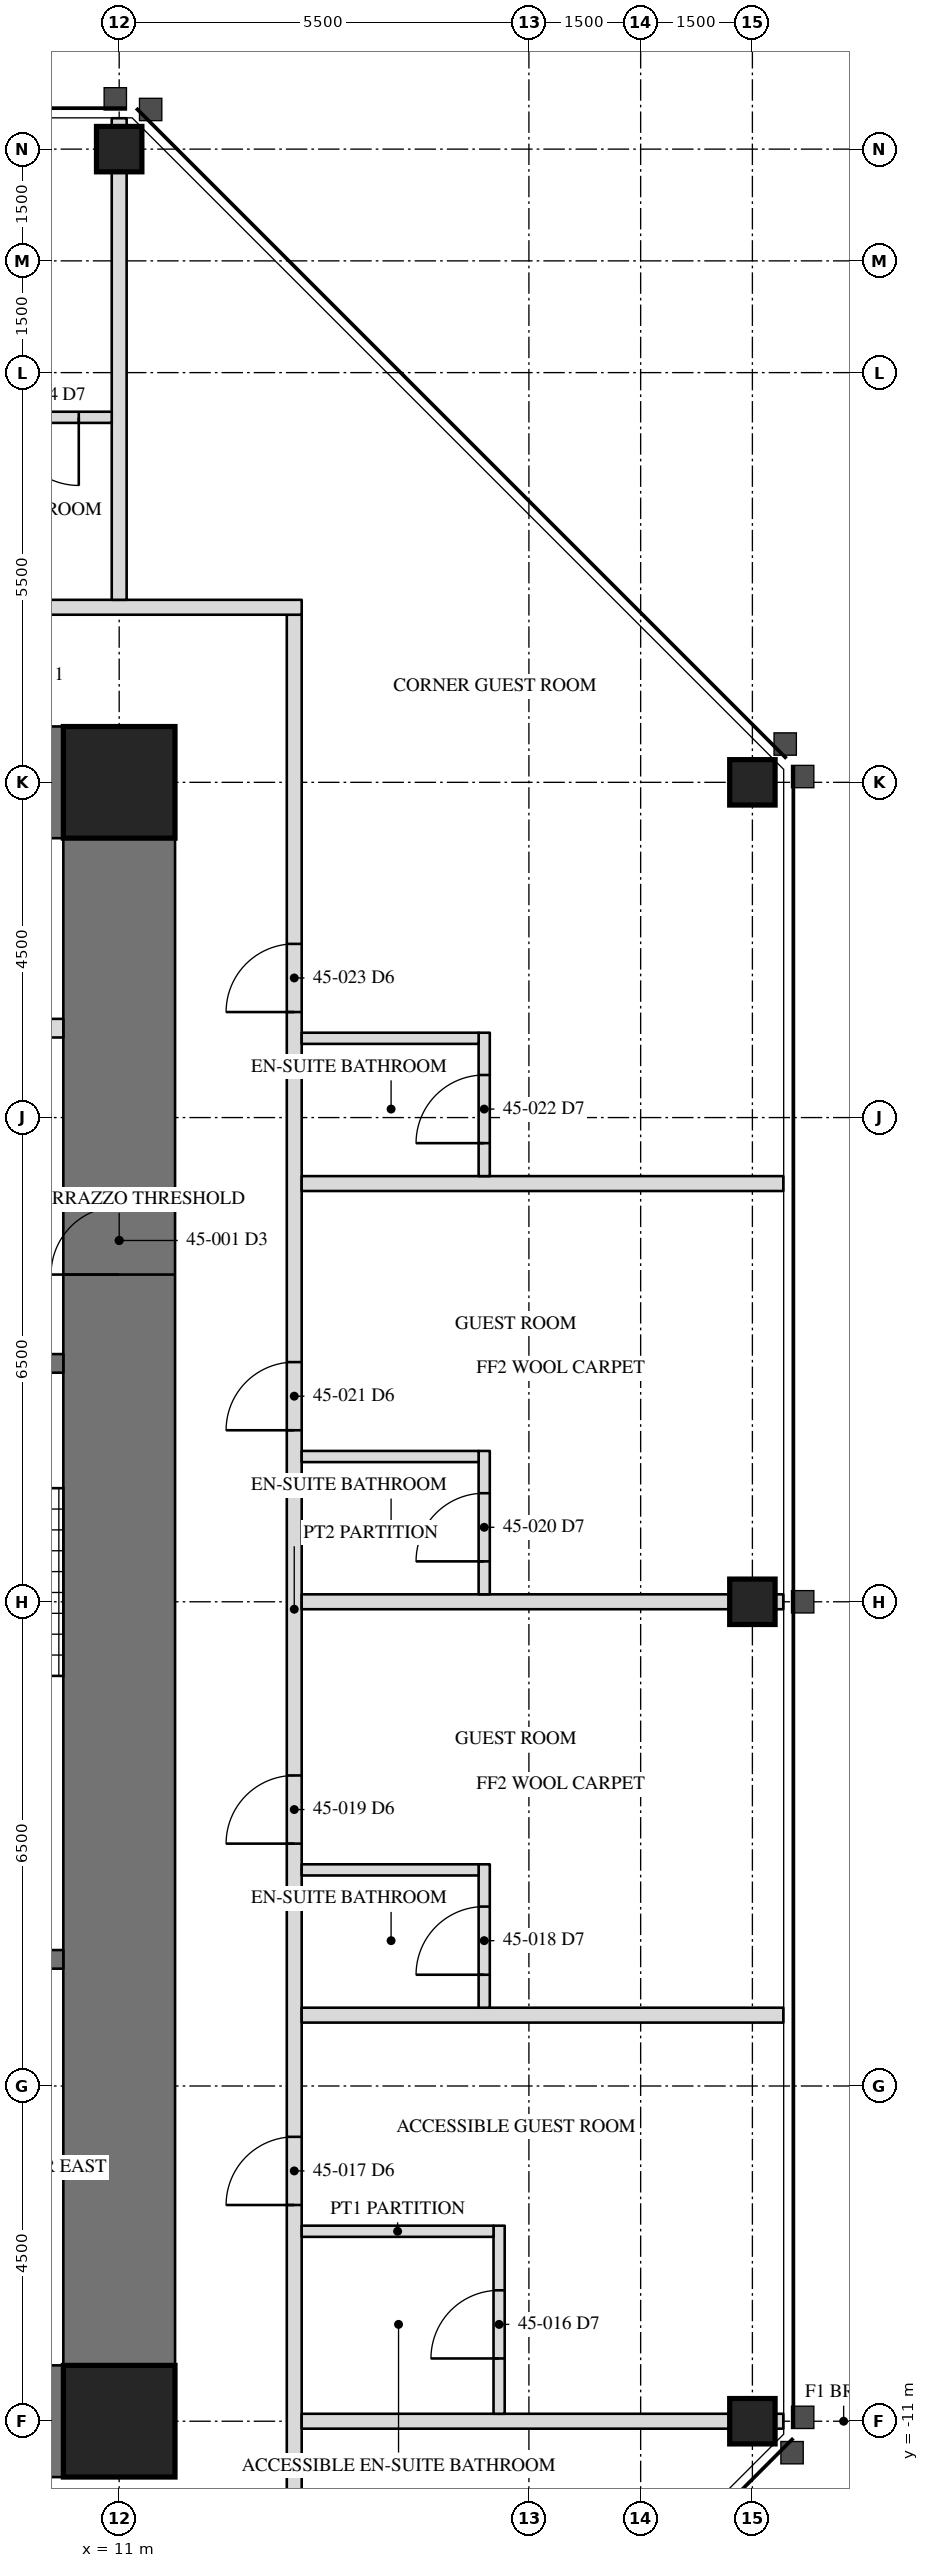
"""IFC4 building model, lengths in metres.
Left out: names, types, materials, properties, quantities, classifications, styles, units other than length and angle.
Written with IfcOpenShell. Run it as: python <this file> out.ifc"""

import sys

from ifc_helpers import new_model, si_unit, direction, frame, frame_2d, origin, origin_2d, place, context, subcontext, project, spatial, rectangle, hollow_rectangle, extrude, element, fill, save


model = new_model("IFC4")
c1 = context("Model", 3, precision=1e-05, world=origin(), true_north=direction((0.0, 1.0)))
c2 = subcontext(c1, "Body", "Model", "MODEL_VIEW")
j1 = project(units=[si_unit("LENGTHUNIT", "METRE"), si_unit("PLANEANGLEUNIT", "RADIAN")], contexts=[c1])
p1 = place(None, origin())
s1 = spatial("IfcSite", under=j1, at=p1, CompositionType="ELEMENT")
p2 = place(p1, origin())
s2 = spatial("IfcBuilding", under=s1, at=p2, CompositionType="ELEMENT")
p3 = place(p2, frame((0.0, 0.0, 194.2)))
s3 = spatial("IfcBuildingStorey", under=s2, at=p3, CompositionType="ELEMENT", Elevation=194.2)
for number, where, z_axis, x_axis in (
    (1, (19.5, -11.0, 0.0), (0.0, 0.0, 1.0), (0.0, 1.0, 0.0)),
    (2, (19.5, 0.0, 0.0), (0.0, 0.0, 1.0), (0.0, 1.0, 0.0)),
    (3, (19.5, 11.0, 0.0), (0.0, 0.0, 1.0), (0.0, 1.0, 0.0)),
    (4, (11.0, 19.5, 0.0), (0.0, 0.0, 1.0), (1.0, 0.0, 0.0)),
):
    element("IfcColumn", number, at=place(p3, frame(where, z_axis=z_axis, x_axis=x_axis)), inside=s3, PredefinedType="COLUMN", context=c2, shape_type="SweptSolid", body=[
        extrude(hollow_rectangle(XDim=0.61, YDim=0.61, WallThickness=0.076, at=origin_2d()), origin(), (0.0, 0.0, 1.0), 3.5),
    ])
p4 = place(p3, frame((11.0, -11.0, 0.0), z_axis=(0.0, 0.0, 1.0), x_axis=(0.0, 1.0, 0.0)))
e5 = element("IfcWall", 5, at=p4, inside=s3, PredefinedType="SHEAR", context=c2, shape_type="SweptSolid", body=[
    extrude(rectangle(XDim=22.0, YDim=1.5, at=frame_2d((11.0, 0.0))), origin(), (0.0, 0.0, 1.0), 3.5),
])
p5 = place(p4, frame((15.393, 0.0, 0.0)))
e6 = element("IfcOpeningElement", 6, at=p5, cuts=e5, PredefinedType="OPENING", context=c2, shape_type="SweptSolid", body=[
    extrude(rectangle(XDim=0.915, YDim=2.134, at=frame_2d((0.458, 1.067))), frame((0.0, 0.76, 0.0), z_axis=(0.0, -1.0, 0.0), x_axis=(1.0, 0.0, 0.0)), (0.0, 0.0, 1.0), 1.52),
])
for number, where, z_axis, x_axis in (
    (7, (11.0, 11.0, 0.0), (0.0, 0.0, 1.0), (-1.0, 0.0, 0.0)),
    (8, (6.5, -11.0, 0.0), (0.0, 0.0, 1.0), (1.0, 0.0, 0.0)),
):
    element("IfcWall", number, at=place(p3, frame(where, z_axis=z_axis, x_axis=x_axis)), inside=s3, PredefinedType="SHEAR", context=c2, shape_type="SweptSolid", body=[
        extrude(rectangle(XDim=4.5, YDim=1.5, at=frame_2d((2.25, 0.0))), origin(), (0.0, 0.0, 1.0), 3.5),
    ])
for number, where, z_axis, x_axis in (
    (9, (11.0, 11.0, 0.0), (0.0, 0.0, 1.0), (1.0, 0.0, 0.0)),
    (10, (11.0, -11.0, 0.0), (0.0, 0.0, 1.0), (1.0, 0.0, 0.0)),
):
    element("IfcColumn", number, at=place(p3, frame(where, z_axis=z_axis, x_axis=x_axis)), inside=s3, PredefinedType="COLUMN", context=c2, shape_type="SweptSolid", body=[
        extrude(hollow_rectangle(XDim=1.499, YDim=1.499, WallThickness=0.102, at=origin_2d()), origin(), (0.0, 0.0, 1.0), 3.5),
    ])
p6 = place(p3, frame((6.95, -4.8, 0.0), z_axis=(0.0, 0.0, 1.0), x_axis=(1.0, 0.0, 0.0)))
e11 = element("IfcWall", 11, at=p6, inside=s3, PredefinedType="SOLIDWALL", context=c2, shape_type="SweptSolid", body=[
    extrude(rectangle(XDim=3.3, YDim=0.25, at=frame_2d((1.65, 0.0))), origin(), (0.0, 0.0, 1.0), 3.31),
])
p7 = place(p3, frame((6.95, 3.2, 0.0), z_axis=(0.0, 0.0, 1.0), x_axis=(1.0, 0.0, 0.0)))
e12 = element("IfcWall", 12, at=p7, inside=s3, PredefinedType="SOLIDWALL", context=c2, shape_type="SweptSolid", body=[
    extrude(rectangle(XDim=3.3, YDim=0.25, at=frame_2d((1.65, 0.0))), origin(), (0.0, 0.0, 1.0), 3.31),
])
p8 = place(p7, frame((1.116, 0.0, 0.0)))
e13 = element("IfcOpeningElement", 13, at=p8, cuts=e12, PredefinedType="OPENING", context=c2, shape_type="SweptSolid", body=[
    extrude(rectangle(XDim=1.067, YDim=2.134, at=frame_2d((0.533, 1.067))), frame((0.0, 0.135, 0.0), z_axis=(0.0, -1.0, 0.0), x_axis=(1.0, 0.0, 0.0)), (0.0, 0.0, 1.0), 0.27),
])
p9 = place(p3, frame((6.95, 7.7, 0.0), z_axis=(0.0, 0.0, 1.0), x_axis=(1.0, 0.0, 0.0)))
e14 = element("IfcWall", 14, at=p9, inside=s3, PredefinedType="PARTITIONING", context=c2, shape_type="SweptSolid", body=[
    extrude(rectangle(XDim=3.3, YDim=0.25, at=frame_2d((1.65, 0.0))), origin(), (0.0, 0.0, 1.0), 3.31),
])
p10 = place(p9, frame((0.45, 0.0, 0.0)))
e15 = element("IfcOpeningElement", 15, at=p10, cuts=e14, PredefinedType="OPENING", context=c2, shape_type="SweptSolid", body=[
    extrude(rectangle(XDim=1.219, YDim=2.134, at=frame_2d((0.609, 1.067))), frame((0.0, 0.135, 0.0), z_axis=(0.0, -1.0, 0.0), x_axis=(1.0, 0.0, 0.0)), (0.0, 0.0, 1.0), 0.27),
])
p11 = place(p3, frame((13.35, -13.45, 0.0), z_axis=(0.0, 0.0, 1.0), x_axis=(0.0, 1.0, 0.0)))
e16 = element("IfcWall", 16, at=p11, inside=s3, PredefinedType="PARTITIONING", context=c2, shape_type="SweptSolid", body=[
    extrude(rectangle(XDim=26.7, YDim=0.2, at=frame_2d((13.35, 0.0))), origin(), (0.0, 0.0, 1.0), 3.31),
])
p12 = place(p11, frame((5.353, 0.0, 0.0)))
e17 = element("IfcOpeningElement", 17, at=p12, cuts=e16, PredefinedType="OPENING", context=c2, shape_type="SweptSolid", body=[
    extrude(rectangle(XDim=0.915, YDim=2.134, at=frame_2d((0.458, 1.067))), frame((0.0, 0.11, 0.0), z_axis=(0.0, -1.0, 0.0), x_axis=(1.0, 0.0, 0.0)), (0.0, 0.0, 1.0), 0.22),
])
p13 = place(p11, frame((10.204, 0.0, 0.0)))
e18 = element("IfcOpeningElement", 18, at=p13, cuts=e16, PredefinedType="OPENING", context=c2, shape_type="SweptSolid", body=[
    extrude(rectangle(XDim=0.915, YDim=2.134, at=frame_2d((0.458, 1.067))), frame((0.0, 0.11, 0.0), z_axis=(0.0, -1.0, 0.0), x_axis=(1.0, 0.0, 0.0)), (0.0, 0.0, 1.0), 0.22),
])
p14 = place(p11, frame((15.752, 0.0, 0.0)))
e19 = element("IfcOpeningElement", 19, at=p14, cuts=e16, PredefinedType="OPENING", context=c2, shape_type="SweptSolid", body=[
    extrude(rectangle(XDim=0.915, YDim=2.134, at=frame_2d((0.458, 1.067))), frame((0.0, 0.11, 0.0), z_axis=(0.0, -1.0, 0.0), x_axis=(1.0, 0.0, 0.0)), (0.0, 0.0, 1.0), 0.22),
])
p15 = place(p11, frame((21.366, 0.0, 0.0)))
e20 = element("IfcOpeningElement", 20, at=p15, cuts=e16, PredefinedType="OPENING", context=c2, shape_type="SweptSolid", body=[
    extrude(rectangle(XDim=0.915, YDim=2.134, at=frame_2d((0.458, 1.067))), frame((0.0, 0.11, 0.0), z_axis=(0.0, -1.0, 0.0), x_axis=(1.0, 0.0, 0.0)), (0.0, 0.0, 1.0), 0.22),
])
p16 = place(p3, frame((13.45, 13.35, 0.0), z_axis=(0.0, 0.0, 1.0), x_axis=(-1.0, 0.0, 0.0)))
e21 = element("IfcWall", 21, at=p16, inside=s3, PredefinedType="PARTITIONING", context=c2, shape_type="SweptSolid", body=[
    extrude(rectangle(XDim=26.7, YDim=0.2, at=frame_2d((13.35, 0.0))), origin(), (0.0, 0.0, 1.0), 3.31),
])
p17 = place(p16, frame((4.752, 0.0, 0.0)))
e22 = element("IfcOpeningElement", 22, at=p17, cuts=e21, PredefinedType="OPENING", context=c2, shape_type="SweptSolid", body=[
    extrude(rectangle(XDim=0.915, YDim=2.134, at=frame_2d((0.458, 1.067))), frame((0.0, 0.11, 0.0), z_axis=(0.0, -1.0, 0.0), x_axis=(1.0, 0.0, 0.0)), (0.0, 0.0, 1.0), 0.22),
])
p18 = place(p16, frame((10.204, 0.0, 0.0)))
e23 = element("IfcOpeningElement", 23, at=p18, cuts=e21, PredefinedType="OPENING", context=c2, shape_type="SweptSolid", body=[
    extrude(rectangle(XDim=0.915, YDim=2.134, at=frame_2d((0.458, 1.067))), frame((0.0, 0.11, 0.0), z_axis=(0.0, -1.0, 0.0), x_axis=(1.0, 0.0, 0.0)), (0.0, 0.0, 1.0), 0.22),
])
p19 = place(p16, frame((15.752, 0.0, 0.0)))
e24 = element("IfcOpeningElement", 24, at=p19, cuts=e21, PredefinedType="OPENING", context=c2, shape_type="SweptSolid", body=[
    extrude(rectangle(XDim=0.915, YDim=2.134, at=frame_2d((0.458, 1.067))), frame((0.0, 0.11, 0.0), z_axis=(0.0, -1.0, 0.0), x_axis=(1.0, 0.0, 0.0)), (0.0, 0.0, 1.0), 0.22),
])
p20 = place(p16, frame((21.366, 0.0, 0.0)))
e25 = element("IfcOpeningElement", 25, at=p20, cuts=e21, PredefinedType="OPENING", context=c2, shape_type="SweptSolid", body=[
    extrude(rectangle(XDim=0.915, YDim=2.134, at=frame_2d((0.458, 1.067))), frame((0.0, 0.11, 0.0), z_axis=(0.0, -1.0, 0.0), x_axis=(1.0, 0.0, 0.0)), (0.0, 0.0, 1.0), 0.22),
])
p21 = place(p3, frame((13.45, -11.0, 0.0), z_axis=(0.0, 0.0, 1.0), x_axis=(1.0, 0.0, 0.0)))
e26 = element("IfcWall", 26, at=p21, inside=s3, PredefinedType="PARTITIONING", context=c2, shape_type="SweptSolid", body=[
    extrude(rectangle(XDim=6.465, YDim=0.2, at=frame_2d((3.232, 0.0))), origin(), (0.0, 0.0, 1.0), 2.802),
])
p22 = place(p3, frame((13.45, -5.549, 0.0), z_axis=(0.0, 0.0, 1.0), x_axis=(1.0, 0.0, 0.0)))
e27 = element("IfcWall", 27, at=p22, inside=s3, PredefinedType="PARTITIONING", context=c2, shape_type="SweptSolid", body=[
    extrude(rectangle(XDim=6.465, YDim=0.2, at=frame_2d((3.232, 0.0))), origin(), (0.0, 0.0, 1.0), 3.31),
])
p23 = place(p3, frame((13.45, 0.0, 0.0), z_axis=(0.0, 0.0, 1.0), x_axis=(1.0, 0.0, 0.0)))
e28 = element("IfcWall", 28, at=p23, inside=s3, PredefinedType="PARTITIONING", context=c2, shape_type="SweptSolid", body=[
    extrude(rectangle(XDim=6.465, YDim=0.2, at=frame_2d((3.232, 0.0))), origin(), (0.0, 0.0, 1.0), 2.802),
])
p24 = place(p3, frame((13.45, 5.614, 0.0), z_axis=(0.0, 0.0, 1.0), x_axis=(1.0, 0.0, 0.0)))
e29 = element("IfcWall", 29, at=p24, inside=s3, PredefinedType="PARTITIONING", context=c2, shape_type="SweptSolid", body=[
    extrude(rectangle(XDim=6.465, YDim=0.2, at=frame_2d((3.232, 0.0))), origin(), (0.0, 0.0, 1.0), 3.31),
])
p25 = place(p3, frame((16.1, -10.9, 0.0), z_axis=(0.0, 0.0, 1.0), x_axis=(0.0, 1.0, 0.0)))
e30 = element("IfcWall", 30, at=p25, inside=s3, PredefinedType="PARTITIONING", context=c2, shape_type="SweptSolid", body=[
    extrude(rectangle(XDim=2.525, YDim=0.15, at=frame_2d((1.262, 0.0))), origin(), (0.0, 0.0, 1.0), 3.31),
])
p26 = place(p25, frame((0.742, 0.0, 0.0)))
e31 = element("IfcOpeningElement", 31, at=p26, cuts=e30, PredefinedType="OPENING", context=c2, shape_type="SweptSolid", body=[
    extrude(rectangle(XDim=0.915, YDim=2.032, at=frame_2d((0.458, 1.016))), frame((0.0, 0.085, 0.0), z_axis=(0.0, -1.0, 0.0), x_axis=(1.0, 0.0, 0.0)), (0.0, 0.0, 1.0), 0.17),
])
p27 = place(p3, frame((13.45, -8.45, 0.0), z_axis=(0.0, 0.0, 1.0), x_axis=(1.0, 0.0, 0.0)))
e32 = element("IfcWall", 32, at=p27, inside=s3, PredefinedType="PARTITIONING", context=c2, shape_type="SweptSolid", body=[
    extrude(rectangle(XDim=2.575, YDim=0.15, at=frame_2d((1.288, 0.0))), origin(), (0.0, 0.0, 1.0), 3.31),
])
p28 = place(p3, frame((15.9, -5.449, 0.0), z_axis=(0.0, 0.0, 1.0), x_axis=(0.0, 1.0, 0.0)))
e33 = element("IfcWall", 33, at=p28, inside=s3, PredefinedType="PARTITIONING", context=c2, shape_type="SweptSolid", body=[
    extrude(rectangle(XDim=1.925, YDim=0.15, at=frame_2d((0.962, 0.0))), origin(), (0.0, 0.0, 1.0), 3.31),
])
p29 = place(p28, frame((0.442, 0.0, 0.0)))
e34 = element("IfcOpeningElement", 34, at=p29, cuts=e33, PredefinedType="OPENING", context=c2, shape_type="SweptSolid", body=[
    extrude(rectangle(XDim=0.915, YDim=2.032, at=frame_2d((0.458, 1.016))), frame((0.0, 0.085, 0.0), z_axis=(0.0, -1.0, 0.0), x_axis=(1.0, 0.0, 0.0)), (0.0, 0.0, 1.0), 0.17),
])
p30 = place(p3, frame((13.45, -3.599, 0.0), z_axis=(0.0, 0.0, 1.0), x_axis=(1.0, 0.0, 0.0)))
e35 = element("IfcWall", 35, at=p30, inside=s3, PredefinedType="PARTITIONING", context=c2, shape_type="SweptSolid", body=[
    extrude(rectangle(XDim=2.375, YDim=0.15, at=frame_2d((1.188, 0.0))), origin(), (0.0, 0.0, 1.0), 2.703),
])
p31 = place(p3, frame((15.9, 0.1, 0.0), z_axis=(0.0, 0.0, 1.0), x_axis=(0.0, 1.0, 0.0)))
e36 = element("IfcWall", 36, at=p31, inside=s3, PredefinedType="PARTITIONING", context=c2, shape_type="SweptSolid", body=[
    extrude(rectangle(XDim=1.925, YDim=0.15, at=frame_2d((0.962, 0.0))), origin(), (0.0, 0.0, 1.0), 3.31),
])
p32 = place(p31, frame((0.442, 0.0, 0.0)))
e37 = element("IfcOpeningElement", 37, at=p32, cuts=e36, PredefinedType="OPENING", context=c2, shape_type="SweptSolid", body=[
    extrude(rectangle(XDim=0.915, YDim=2.032, at=frame_2d((0.458, 1.016))), frame((0.0, 0.085, 0.0), z_axis=(0.0, -1.0, 0.0), x_axis=(1.0, 0.0, 0.0)), (0.0, 0.0, 1.0), 0.17),
])
p33 = place(p3, frame((13.45, 1.95, 0.0), z_axis=(0.0, 0.0, 1.0), x_axis=(1.0, 0.0, 0.0)))
e38 = element("IfcWall", 38, at=p33, inside=s3, PredefinedType="PARTITIONING", context=c2, shape_type="SweptSolid", body=[
    extrude(rectangle(XDim=2.375, YDim=0.15, at=frame_2d((1.188, 0.0))), origin(), (0.0, 0.0, 1.0), 3.31),
])
p34 = place(p3, frame((15.9, 5.714, 0.0), z_axis=(0.0, 0.0, 1.0), x_axis=(0.0, 1.0, 0.0)))
e39 = element("IfcWall", 39, at=p34, inside=s3, PredefinedType="PARTITIONING", context=c2, shape_type="SweptSolid", body=[
    extrude(rectangle(XDim=1.925, YDim=0.15, at=frame_2d((0.962, 0.0))), origin(), (0.0, 0.0, 1.0), 3.31),
])
p35 = place(p34, frame((0.442, 0.0, 0.0)))
e40 = element("IfcOpeningElement", 40, at=p35, cuts=e39, PredefinedType="OPENING", context=c2, shape_type="SweptSolid", body=[
    extrude(rectangle(XDim=0.915, YDim=2.032, at=frame_2d((0.458, 1.016))), frame((0.0, 0.085, 0.0), z_axis=(0.0, -1.0, 0.0), x_axis=(1.0, 0.0, 0.0)), (0.0, 0.0, 1.0), 0.17),
])
p36 = place(p3, frame((13.45, 7.564, 0.0), z_axis=(0.0, 0.0, 1.0), x_axis=(1.0, 0.0, 0.0)))
e41 = element("IfcWall", 41, at=p36, inside=s3, PredefinedType="PARTITIONING", context=c2, shape_type="SweptSolid", body=[
    extrude(rectangle(XDim=2.375, YDim=0.15, at=frame_2d((1.188, 0.0))), origin(), (0.0, 0.0, 1.0), 3.31),
])
p37 = place(p3, frame((11.0, 13.45, 0.0), z_axis=(0.0, 0.0, 1.0), x_axis=(0.0, 1.0, 0.0)))
e42 = element("IfcWall", 42, at=p37, inside=s3, PredefinedType="PARTITIONING", context=c2, shape_type="SweptSolid", body=[
    extrude(rectangle(XDim=6.465, YDim=0.2, at=frame_2d((3.232, 0.0))), origin(), (0.0, 0.0, 1.0), 2.802),
])
p38 = place(p3, frame((10.9, 15.9, 0.0), z_axis=(0.0, 0.0, 1.0), x_axis=(-1.0, 0.0, 0.0)))
e43 = element("IfcWall", 43, at=p38, inside=s3, PredefinedType="PARTITIONING", context=c2, shape_type="SweptSolid", body=[
    extrude(rectangle(XDim=1.925, YDim=0.15, at=frame_2d((0.962, 0.0))), origin(), (0.0, 0.0, 1.0), 3.31),
])
p39 = place(p38, frame((0.442, 0.0, 0.0)))
e44 = element("IfcOpeningElement", 44, at=p39, cuts=e43, PredefinedType="OPENING", context=c2, shape_type="SweptSolid", body=[
    extrude(rectangle(XDim=0.915, YDim=2.032, at=frame_2d((0.458, 1.016))), frame((0.0, 0.085, 0.0), z_axis=(0.0, -1.0, 0.0), x_axis=(1.0, 0.0, 0.0)), (0.0, 0.0, 1.0), 0.17),
])
p40 = place(p5, origin())
e45 = element("IfcDoor", 45, at=p40, inside=s3, OperationType="SINGLE_SWING_RIGHT", PredefinedType="DOOR", context=c2, shape_type="SweptSolid", body=[
    extrude(rectangle(XDim=0.915, YDim=2.134, at=frame_2d((0.458, 1.067))), frame((0.0, -0.675, 0.0), z_axis=(0.0, -1.0, 0.0), x_axis=(1.0, 0.0, 0.0)), (0.0, 0.0, 1.0), 0.05),
])
fill(e6, e45)
p41 = place(p26, origin())
e46 = element("IfcDoor", 46, at=p41, inside=s3, OperationType="SINGLE_SWING_LEFT", PredefinedType="DOOR", context=c2, shape_type="SweptSolid", body=[
    extrude(rectangle(XDim=0.915, YDim=2.032, at=frame_2d((0.458, 1.016))), frame((0.0, 0.025, 0.0), z_axis=(0.0, -1.0, 0.0), x_axis=(1.0, 0.0, 0.0)), (0.0, 0.0, 1.0), 0.05),
])
fill(e31, e46)
p42 = place(p12, origin())
e47 = element("IfcDoor", 47, at=p42, inside=s3, OperationType="SINGLE_SWING_LEFT", PredefinedType="DOOR", context=c2, shape_type="SweptSolid", body=[
    extrude(rectangle(XDim=0.915, YDim=2.134, at=frame_2d((0.458, 1.067))), frame((0.0, 0.025, 0.0), z_axis=(0.0, -1.0, 0.0), x_axis=(1.0, 0.0, 0.0)), (0.0, 0.0, 1.0), 0.05),
])
fill(e17, e47)
p43 = place(p29, origin())
e48 = element("IfcDoor", 48, at=p43, inside=s3, OperationType="SINGLE_SWING_LEFT", PredefinedType="DOOR", context=c2, shape_type="SweptSolid", body=[
    extrude(rectangle(XDim=0.915, YDim=2.032, at=frame_2d((0.458, 1.016))), frame((0.0, 0.025, 0.0), z_axis=(0.0, -1.0, 0.0), x_axis=(1.0, 0.0, 0.0)), (0.0, 0.0, 1.0), 0.05),
])
fill(e34, e48)
p44 = place(p13, origin())
e49 = element("IfcDoor", 49, at=p44, inside=s3, OperationType="SINGLE_SWING_LEFT", PredefinedType="DOOR", context=c2, shape_type="SweptSolid", body=[
    extrude(rectangle(XDim=0.915, YDim=2.134, at=frame_2d((0.458, 1.067))), frame((0.0, 0.025, 0.0), z_axis=(0.0, -1.0, 0.0), x_axis=(1.0, 0.0, 0.0)), (0.0, 0.0, 1.0), 0.05),
])
fill(e18, e49)
p45 = place(p32, origin())
e50 = element("IfcDoor", 50, at=p45, inside=s3, OperationType="SINGLE_SWING_LEFT", PredefinedType="DOOR", context=c2, shape_type="SweptSolid", body=[
    extrude(rectangle(XDim=0.915, YDim=2.032, at=frame_2d((0.458, 1.016))), frame((0.0, 0.025, 0.0), z_axis=(0.0, -1.0, 0.0), x_axis=(1.0, 0.0, 0.0)), (0.0, 0.0, 1.0), 0.05),
])
fill(e37, e50)
p46 = place(p14, origin())
e51 = element("IfcDoor", 51, at=p46, inside=s3, OperationType="SINGLE_SWING_LEFT", PredefinedType="DOOR", context=c2, shape_type="SweptSolid", body=[
    extrude(rectangle(XDim=0.915, YDim=2.134, at=frame_2d((0.458, 1.067))), frame((0.0, 0.025, 0.0), z_axis=(0.0, -1.0, 0.0), x_axis=(1.0, 0.0, 0.0)), (0.0, 0.0, 1.0), 0.05),
])
fill(e19, e51)
p47 = place(p35, origin())
e52 = element("IfcDoor", 52, at=p47, inside=s3, OperationType="SINGLE_SWING_LEFT", PredefinedType="DOOR", context=c2, shape_type="SweptSolid", body=[
    extrude(rectangle(XDim=0.915, YDim=2.032, at=frame_2d((0.458, 1.016))), frame((0.0, 0.025, 0.0), z_axis=(0.0, -1.0, 0.0), x_axis=(1.0, 0.0, 0.0)), (0.0, 0.0, 1.0), 0.05),
])
fill(e40, e52)
p48 = place(p15, origin())
e53 = element("IfcDoor", 53, at=p48, inside=s3, OperationType="SINGLE_SWING_LEFT", PredefinedType="DOOR", context=c2, shape_type="SweptSolid", body=[
    extrude(rectangle(XDim=0.915, YDim=2.134, at=frame_2d((0.458, 1.067))), frame((0.0, 0.025, 0.0), z_axis=(0.0, -1.0, 0.0), x_axis=(1.0, 0.0, 0.0)), (0.0, 0.0, 1.0), 0.05),
])
fill(e20, e53)
p49 = place(p39, origin())
e54 = element("IfcDoor", 54, at=p49, inside=s3, OperationType="SINGLE_SWING_LEFT", PredefinedType="DOOR", context=c2, shape_type="SweptSolid", body=[
    extrude(rectangle(XDim=0.915, YDim=2.032, at=frame_2d((0.458, 1.016))), frame((0.0, 0.025, 0.0), z_axis=(0.0, -1.0, 0.0), x_axis=(1.0, 0.0, 0.0)), (0.0, 0.0, 1.0), 0.05),
])
fill(e44, e54)
save(model, sys.argv[1])
